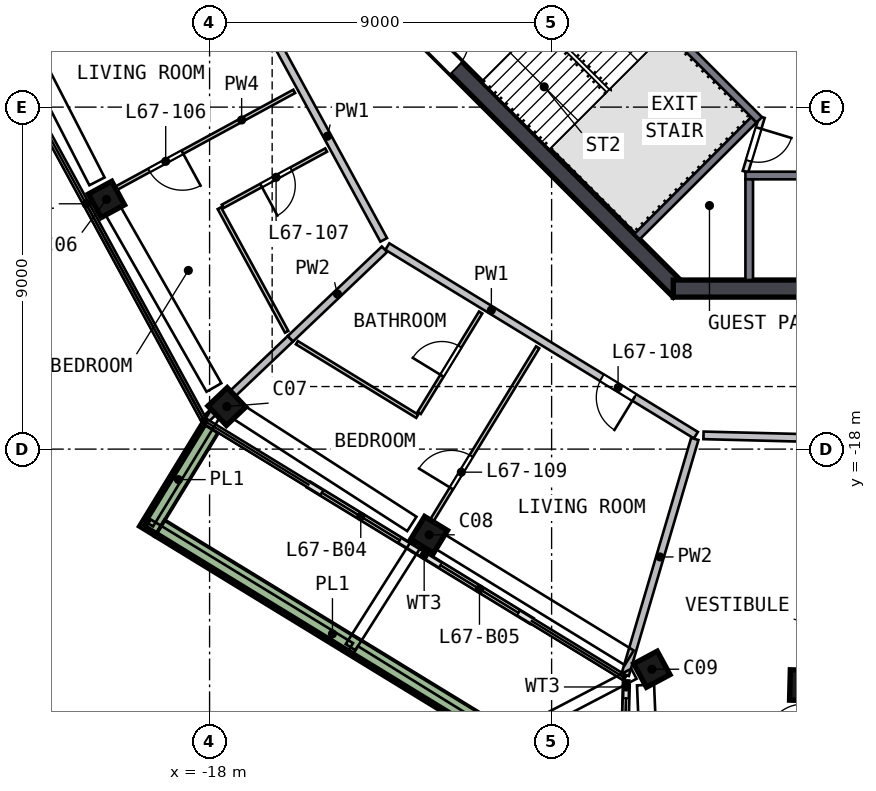
"""IFC4 building model, lengths in metres.
Left out: names, types, materials, properties, quantities, classifications, styles, units other than length and angle.
Written with IfcOpenShell. Run it as: python <this file> out.ifc"""

import sys

from ifc_helpers import new_model, si_unit, direction, frame, frame_2d, origin, origin_2d, place, context, subcontext, project, spatial, rectangle, extrude, element, fill, save


model = new_model("IFC4")
c1 = context("Model", 3, precision=1e-05, world=origin(), true_north=direction((0.0, 1.0)))
c2 = subcontext(c1, "Body", "Model", "MODEL_VIEW")
j1 = project(units=[si_unit("LENGTHUNIT", "METRE"), si_unit("PLANEANGLEUNIT", "RADIAN")], contexts=[c1])
p1 = place(None, origin())
s1 = spatial("IfcSite", under=j1, at=p1, CompositionType="ELEMENT")
p2 = place(p1, origin())
s2 = spatial("IfcBuilding", under=s1, at=p2, CompositionType="ELEMENT")
p3 = place(p2, frame((0.0, 0.0, 274.0)))
s3 = spatial("IfcBuildingStorey", under=s2, at=p3, CompositionType="ELEMENT", Elevation=274.0)
p4 = place(p3, frame((-20.78, -11.311, 0.0), z_axis=(0.054678505, -0.0984061, 0.993643045), x_axis=(0.475225292, -0.872632983, -0.112572636)))
e1 = element("IfcColumn", 1, at=p4, inside=s3, PredefinedType="COLUMN", context=c2, shape_type="SweptSolid", body=[
    extrude(rectangle(XDim=0.7, YDim=0.7, at=origin_2d()), origin(), (0.0, 0.0, 1.0), 3.21),
])
p5 = place(p3, frame((-17.644, -16.779, 0.0), z_axis=(0.080429245, -0.083241987, 0.993278364), x_axis=(-0.684092384, 0.720153088, 0.115746011)))
e2 = element("IfcColumn", 2, at=p5, inside=s3, PredefinedType="COLUMN", context=c2, shape_type="SweptSolid", body=[
    extrude(rectangle(XDim=0.7, YDim=0.7, at=origin_2d()), origin(), (0.0, 0.0, 1.0), 3.211),
])
p6 = place(p3, frame((-12.34, -20.185, 0.0), z_axis=(0.096505434, -0.057872841, 0.993648547), x_axis=(0.847798451, -0.518243304, -0.112524062)))
e3 = element("IfcColumn", 3, at=p6, inside=s3, PredefinedType="COLUMN", context=c2, shape_type="SweptSolid", body=[
    extrude(rectangle(XDim=0.7, YDim=0.7, at=origin_2d()), origin(), (0.0, 0.0, 1.0), 3.21),
])
p7 = place(p3, frame((-6.499, -23.756, 0.0), z_axis=(0.113176251, -0.029947242, 0.993123506), x_axis=(-0.470487, 0.878762487, 0.080115381)))
e4 = element("IfcColumn", 4, at=p7, inside=s3, PredefinedType="COLUMN", context=c2, shape_type="SweptSolid", body=[
    extrude(rectangle(XDim=0.7, YDim=0.7, at=origin_2d()), origin(), (0.0, 0.0, 1.0), 3.212),
])
p8 = place(p3, frame((-2.466, -24.204, 0.0), z_axis=(0.115246525, -0.010718839, 0.993279087), x_axis=(-0.025644135, -0.99964061, -0.007812094)))
e5 = element("IfcColumn", 5, at=p8, inside=s3, PredefinedType="COLUMN", context=c2, shape_type="SweptSolid", body=[
    extrude(rectangle(XDim=0.8, YDim=0.8, at=origin_2d()), origin(), (0.0, 0.0, 1.0), 3.211),
])
p9 = place(p3, frame((-13.841, -5.64, 0.0), z_axis=(0.0, 0.0, 1.0), x_axis=(0.707106781, -0.707106781, 0.0)))
e6 = element("IfcWall", 6, at=p9, inside=s3, PredefinedType="SHEAR", context=c2, shape_type="SweptSolid", body=[
    extrude(rectangle(XDim=11.598, YDim=0.45, at=frame_2d((5.799, 0.0))), origin(), (0.0, 0.0, 1.0), 3.5),
])
p10 = place(p9, frame((2.099, 0.0, 0.0)))
e7 = element("IfcOpeningElement", 7, at=p10, cuts=e6, PredefinedType="OPENING", context=c2, shape_type="SweptSolid", body=[
    extrude(rectangle(XDim=1.2, YDim=2.1, at=frame_2d((0.6, 1.05))), frame((0.0, 0.235, 0.0), z_axis=(0.0, -1.0, 0.0), x_axis=(1.0, 0.0, 0.0)), (0.0, 0.0, 1.0), 0.47),
])
p11 = place(p3, frame((-5.799, -13.775, 0.0), z_axis=(0.0, 0.0, 1.0), x_axis=(1.0, 0.0, 0.0)))
e8 = element("IfcWall", 8, at=p11, inside=s3, PredefinedType="SHEAR", context=c2, shape_type="SweptSolid", body=[
    extrude(rectangle(XDim=11.598, YDim=0.45, at=frame_2d((5.799, 0.0))), origin(), (0.0, 0.0, 1.0), 3.5),
])
p12 = place(p3, frame((-15.387, -18.938, 0.0), z_axis=(0.0, 0.0, 1.0), x_axis=(0.853194542, -0.521592824, 0.0)))
e9 = element("IfcWall", 9, at=p12, inside=s3, PredefinedType="SOLIDWALL", context=c2, shape_type="SweptSolid", body=[
    extrude(rectangle(XDim=3.25, YDim=0.15, at=frame_2d((1.625, 0.0))), origin(), (0.0, 0.0, 1.0), 2.525),
])
p13 = place(p12, frame((0.4, 0.0, 0.0)))
e10 = element("IfcOpeningElement", 10, at=p13, cuts=e9, PredefinedType="OPENING", context=c2, shape_type="SweptSolid", body=[
    extrude(rectangle(XDim=2.4, YDim=2.4, at=frame_2d((1.2, 1.2))), frame((0.0, 0.085, 0.0), z_axis=(0.0, -1.0, 0.0), x_axis=(1.0, 0.0, 0.0)), (0.0, 0.0, 1.0), 0.17),
])
p14 = place(p3, frame((-12.614, -20.633, 0.0), z_axis=(0.0, 0.0, 1.0), x_axis=(0.853186571, -0.521605862, 0.0)))
e11 = element("IfcWall", 11, at=p14, inside=s3, PredefinedType="SOLIDWALL", context=c2, shape_type="SweptSolid", body=[
    extrude(rectangle(XDim=3.612, YDim=0.15, at=frame_2d((1.806, 0.0))), origin(), (0.0, 0.0, 1.0), 2.525),
])
p15 = place(p14, frame((0.811, 0.0, 0.0)))
e12 = element("IfcOpeningElement", 12, at=p15, cuts=e11, PredefinedType="OPENING", context=c2, shape_type="SweptSolid", body=[
    extrude(rectangle(XDim=2.4, YDim=2.4, at=frame_2d((1.2, 1.2))), frame((0.0, 0.085, 0.0), z_axis=(0.0, -1.0, 0.0), x_axis=(1.0, 0.0, 0.0)), (0.0, 0.0, 1.0), 0.17),
])
p16 = place(p3, frame((-7.034, -24.159, 0.0), z_axis=(0.0, 0.0, 1.0), x_axis=(-0.025100843, -0.999684924, 0.0)))
e13 = element("IfcWall", 13, at=p16, inside=s3, PredefinedType="SOLIDWALL", context=c2, shape_type="SweptSolid", body=[
    extrude(rectangle(XDim=3.2, YDim=0.15, at=frame_2d((1.6, 0.0))), origin(), (0.0, 0.0, 1.0), 2.525),
])
p17 = place(p16, frame((0.4, 0.0, 0.0)))
e14 = element("IfcOpeningElement", 14, at=p17, cuts=e13, PredefinedType="OPENING", context=c2, shape_type="SweptSolid", body=[
    extrude(rectangle(XDim=2.4, YDim=2.4, at=frame_2d((1.2, 1.2))), frame((0.0, 0.085, 0.0), z_axis=(0.0, -1.0, 0.0), x_axis=(1.0, 0.0, 0.0)), (0.0, 0.0, 1.0), 0.17),
])
p18 = place(p3, frame((-17.986, -17.438, 0.0), z_axis=(0.0, 0.0, 1.0), x_axis=(-0.521582752, -0.853200699, 0.0)))
e15 = element("IfcWall", 15, at=p18, inside=s3, PredefinedType="SOLIDWALL", context=c2, shape_type="SweptSolid", body=[
    extrude(rectangle(XDim=3.199, YDim=0.5, at=frame_2d((1.599, 0.0))), origin(), (0.0, 0.0, 1.0), 0.7),
])
p19 = place(p3, frame((-19.311, -20.084, 0.0), z_axis=(0.0, 0.0, 1.0), x_axis=(0.853182108, -0.521613162, 0.0)))
e16 = element("IfcWall", 16, at=p19, inside=s3, PredefinedType="SOLIDWALL", context=c2, shape_type="SweptSolid", body=[
    extrude(rectangle(XDim=10.652, YDim=0.5, at=frame_2d((5.326, 0.0))), origin(), (0.0, 0.0, 1.0), 0.7),
])
p20 = place(p3, frame((-3.9, -10.8, 0.0), z_axis=(0.0, 0.0, 1.0), x_axis=(1.0, 0.0, 0.0)))
e17 = element("IfcWall", 17, at=p20, inside=s3, PredefinedType="SOLIDWALL", context=c2, shape_type="SweptSolid", body=[
    extrude(rectangle(XDim=7.8, YDim=0.2, at=frame_2d((3.9, 0.0))), origin(), (0.0, 0.0, 1.0), 3.19),
])
p21 = place(p20, frame((3.45, 0.0, 0.0)))
e18 = element("IfcOpeningElement", 18, at=p21, cuts=e17, PredefinedType="OPENING", context=c2, shape_type="SweptSolid", body=[
    extrude(rectangle(XDim=0.9, YDim=2.1, at=frame_2d((0.45, 1.05))), frame((0.0, 0.11, 0.0), z_axis=(0.0, -1.0, 0.0), x_axis=(1.0, 0.0, 0.0)), (0.0, 0.0, 1.0), 0.22),
])
p22 = place(p3, frame((-3.8, -10.9, 0.0), z_axis=(0.0, 0.0, 1.0), x_axis=(0.0, -1.0, 0.0)))
e19 = element("IfcWall", 19, at=p22, inside=s3, PredefinedType="SOLIDWALL", context=c2, shape_type="SweptSolid", body=[
    extrude(rectangle(XDim=2.65, YDim=0.2, at=frame_2d((1.325, 0.0))), origin(), (0.0, 0.0, 1.0), 3.19),
])
p23 = place(p3, frame((-3.535, -9.334, 0.0), z_axis=(0.0, 0.0, 1.0), x_axis=(-0.707120946, 0.707092617, 0.0)))
e20 = element("IfcWall", 20, at=p23, inside=s3, PredefinedType="SOLIDWALL", context=c2, shape_type="SweptSolid", body=[
    extrude(rectangle(XDim=8.618, YDim=0.2, at=frame_2d((4.309, 0.0))), origin(), (0.0, 0.0, 1.0), 3.19),
])
p24 = place(p23, frame((6.6, 0.0, 0.0)))
e21 = element("IfcOpeningElement", 21, at=p24, cuts=e20, PredefinedType="OPENING", context=c2, shape_type="SweptSolid", body=[
    extrude(rectangle(XDim=1.2, YDim=2.1, at=frame_2d((0.6, 1.05))), frame((0.0, 0.11, 0.0), z_axis=(0.0, -1.0, 0.0), x_axis=(1.0, 0.0, 0.0)), (0.0, 0.0, 1.0), 0.22),
])
p25 = place(p3, frame((-3.677, -9.334, 0.0), z_axis=(0.0, 0.0, 1.0), x_axis=(-0.707106781, -0.707106781, 0.0)))
e22 = element("IfcWall", 22, at=p25, inside=s3, PredefinedType="SOLIDWALL", context=c2, shape_type="SweptSolid", body=[
    extrude(rectangle(XDim=4.35, YDim=0.2, at=frame_2d((2.175, 0.0))), origin(), (0.0, 0.0, 1.0), 3.19),
])
p26 = place(p3, frame((-3.465, -9.263, 0.0), z_axis=(0.0, 0.0, 1.0), x_axis=(-0.289808785, -0.957084567, 0.0)))
e23 = element("IfcWall", 23, at=p26, inside=s3, PredefinedType="PARTITIONING", context=c2, shape_type="SweptSolid", body=[
    extrude(rectangle(XDim=1.501, YDim=0.15, at=frame_2d((0.75, 0.0))), origin(), (0.0, 0.0, 1.0), 3.19),
])
p27 = place(p26, frame((0.301, 0.0, 0.0)))
e24 = element("IfcOpeningElement", 24, at=p27, cuts=e23, PredefinedType="OPENING", context=c2, shape_type="SweptSolid", body=[
    extrude(rectangle(XDim=0.9, YDim=2.1, at=frame_2d((0.45, 1.05))), frame((0.0, 0.085, 0.0), z_axis=(0.0, -1.0, 0.0), x_axis=(1.0, 0.0, 0.0)), (0.0, 0.0, 1.0), 0.17),
])
p28 = place(p3, frame((-13.418, -12.493, 0.0), z_axis=(0.0, 0.0, 1.0), x_axis=(-0.478080636, 0.878315948, 0.0)))
e25 = element("IfcWall", 25, at=p28, inside=s3, PredefinedType="SOLIDWALL", context=c2, shape_type="SweptSolid", body=[
    extrude(rectangle(XDim=9.337, YDim=0.2, at=frame_2d((4.668, 0.0))), origin(), (0.0, 0.0, 1.0), 3.19),
])
p29 = place(p28, frame((6.408, 0.0, 0.0)))
e26 = element("IfcOpeningElement", 26, at=p29, cuts=e25, PredefinedType="OPENING", context=c2, shape_type="SweptSolid", body=[
    extrude(rectangle(XDim=1.0, YDim=2.1, at=frame_2d((0.5, 1.05))), frame((0.0, 0.11, 0.0), z_axis=(0.0, -1.0, 0.0), x_axis=(1.0, 0.0, 0.0)), (0.0, 0.0, 1.0), 0.22),
])
p30 = place(p3, frame((-5.203, -17.633, 0.0), z_axis=(0.0, 0.0, 1.0), x_axis=(-0.853187331, 0.521604619, 0.0)))
e27 = element("IfcWall", 27, at=p30, inside=s3, PredefinedType="SOLIDWALL", context=c2, shape_type="SweptSolid", body=[
    extrude(rectangle(XDim=9.517, YDim=0.2, at=frame_2d((4.758, 0.0))), origin(), (0.0, 0.0, 1.0), 3.19),
])
p31 = place(p30, frame((1.9, 0.0, 0.0)))
e28 = element("IfcOpeningElement", 28, at=p31, cuts=e27, PredefinedType="OPENING", context=c2, shape_type="SweptSolid", body=[
    extrude(rectangle(XDim=1.0, YDim=2.1, at=frame_2d((0.5, 1.05))), frame((0.0, 0.11, 0.0), z_axis=(0.0, -1.0, 0.0), x_axis=(1.0, 0.0, 0.0)), (0.0, 0.0, 1.0), 0.22),
])
p32 = place(p3, frame((4.311, -17.872, 0.0), z_axis=(0.0, 0.0, 1.0), x_axis=(-0.999684183, 0.025130335, 0.0)))
e29 = element("IfcWall", 29, at=p32, inside=s3, PredefinedType="SOLIDWALL", context=c2, shape_type="SweptSolid", body=[
    extrude(rectangle(XDim=9.317, YDim=0.2, at=frame_2d((4.658, 0.0))), origin(), (0.0, 0.0, 1.0), 3.19),
])
p33 = place(p32, frame((3.842, 0.0, 0.0)))
e30 = element("IfcOpeningElement", 30, at=p33, cuts=e29, PredefinedType="OPENING", context=c2, shape_type="SweptSolid", body=[
    extrude(rectangle(XDim=1.8, YDim=2.1, at=frame_2d((0.9, 1.05))), frame((0.0, 0.11, 0.0), z_axis=(0.0, -1.0, 0.0), x_axis=(1.0, 0.0, 0.0)), (0.0, 0.0, 1.0), 0.22),
])
p34 = place(p3, frame((-15.873, -15.095, 0.0), z_axis=(0.0, 0.0, 1.0), x_axis=(-0.724638726, -0.689128955, 0.0)))
e31 = element("IfcWall", 31, at=p34, inside=s3, PredefinedType="SOLIDWALL", context=c2, shape_type="SweptSolid", body=[
    extrude(rectangle(XDim=3.06, YDim=0.2, at=frame_2d((1.53, 0.0))), origin(), (0.0, 0.0, 1.0), 3.19),
])
p35 = place(p3, frame((-13.398, -12.74, 0.0), z_axis=(0.0, 0.0, 1.0), x_axis=(-0.724642487, -0.689125, 0.0)))
e32 = element("IfcWall", 32, at=p35, inside=s3, PredefinedType="SOLIDWALL", context=c2, shape_type="SweptSolid", body=[
    extrude(rectangle(XDim=3.416, YDim=0.2, at=frame_2d((1.708, 0.0))), origin(), (0.0, 0.0, 1.0), 3.19),
])
p36 = place(p3, frame((-7.065, -23.944, 0.0), z_axis=(0.0, 0.0, 1.0), x_axis=(0.283011215, 0.9591166, 0.0)))
e33 = element("IfcWall", 33, at=p36, inside=s3, PredefinedType="SOLIDWALL", context=c2, shape_type="SweptSolid", body=[
    extrude(rectangle(XDim=6.476, YDim=0.2, at=frame_2d((3.238, 0.0))), origin(), (0.0, 0.0, 1.0), 3.19),
])
p37 = place(p3, frame((-15.773, -8.585, 0.0), z_axis=(0.0, 0.0, 1.0), x_axis=(-0.878315476, -0.478081504, 0.0)))
e34 = element("IfcWall", 34, at=p37, inside=s3, PredefinedType="PARTITIONING", context=c2, shape_type="SweptSolid", body=[
    extrude(rectangle(XDim=6.15, YDim=0.1, at=frame_2d((3.075, 0.0))), origin(), (0.0, 0.0, 1.0), 3.19),
])
p38 = place(p37, frame((3.35, 0.0, 0.0)))
e35 = element("IfcOpeningElement", 35, at=p38, cuts=e34, PredefinedType="OPENING", context=c2, shape_type="SweptSolid", body=[
    extrude(rectangle(XDim=1.0, YDim=2.1, at=frame_2d((0.5, 1.05))), frame((0.0, 0.06, 0.0), z_axis=(0.0, -1.0, 0.0), x_axis=(1.0, 0.0, 0.0)), (0.0, 0.0, 1.0), 0.12),
])
p39 = place(p3, frame((-17.743, -11.66, 0.0), z_axis=(0.0, 0.0, 1.0), x_axis=(0.478053023, -0.878330978, 0.0)))
e36 = element("IfcWall", 36, at=p39, inside=s3, PredefinedType="PARTITIONING", context=c2, shape_type="SweptSolid", body=[
    extrude(rectangle(XDim=3.704, YDim=0.1, at=frame_2d((1.852, 0.0))), origin(), (0.0, 0.0, 1.0), 3.19),
])
p40 = place(p3, frame((-14.933, -10.13, 0.0), z_axis=(0.0, 0.0, 1.0), x_axis=(-0.87832263, -0.478068361, 0.0)))
e37 = element("IfcWall", 37, at=p40, inside=s3, PredefinedType="PARTITIONING", context=c2, shape_type="SweptSolid", body=[
    extrude(rectangle(XDim=3.1, YDim=0.1, at=frame_2d((1.55, 0.0))), origin(), (0.0, 0.0, 1.0), 3.19),
])
p41 = place(p40, frame((1.05, 0.0, 0.0)))
e38 = element("IfcOpeningElement", 38, at=p41, cuts=e37, PredefinedType="OPENING", context=c2, shape_type="SweptSolid", body=[
    extrude(rectangle(XDim=0.9, YDim=2.1, at=frame_2d((0.45, 1.05))), frame((0.0, 0.06, 0.0), z_axis=(0.0, -1.0, 0.0), x_axis=(1.0, 0.0, 0.0)), (0.0, 0.0, 1.0), 0.12),
])
p42 = place(p3, frame((-15.703, -15.199, 0.0), z_axis=(0.0, 0.0, 1.0), x_axis=(0.853161467, -0.521646921, 0.0)))
e39 = element("IfcWall", 39, at=p42, inside=s3, PredefinedType="PARTITIONING", context=c2, shape_type="SweptSolid", body=[
    extrude(rectangle(XDim=3.711, YDim=0.1, at=frame_2d((1.855, 0.0))), origin(), (0.0, 0.0, 1.0), 3.19),
])
p43 = place(p3, frame((-12.484, -17.05, 0.0), z_axis=(0.0, 0.0, 1.0), x_axis=(0.521669797, 0.85314748, 0.0)))
e40 = element("IfcWall", 40, at=p43, inside=s3, PredefinedType="PARTITIONING", context=c2, shape_type="SweptSolid", body=[
    extrude(rectangle(XDim=3.1, YDim=0.1, at=frame_2d((1.55, 0.0))), origin(), (0.0, 0.0, 1.0), 3.19),
])
p44 = place(p43, frame((1.15, 0.0, 0.0)))
e41 = element("IfcOpeningElement", 41, at=p44, cuts=e40, PredefinedType="OPENING", context=c2, shape_type="SweptSolid", body=[
    extrude(rectangle(XDim=0.9, YDim=2.1, at=frame_2d((0.45, 1.05))), frame((0.0, 0.06, 0.0), z_axis=(0.0, -1.0, 0.0), x_axis=(1.0, 0.0, 0.0)), (0.0, 0.0, 1.0), 0.12),
])
p45 = place(p3, frame((-12.575, -20.569, 0.0), z_axis=(0.0, 0.0, 1.0), x_axis=(0.521594521, 0.853193504, 0.0)))
e42 = element("IfcWall", 42, at=p45, inside=s3, PredefinedType="PARTITIONING", context=c2, shape_type="SweptSolid", body=[
    extrude(rectangle(XDim=6.15, YDim=0.1, at=frame_2d((3.075, 0.0))), origin(), (0.0, 0.0, 1.0), 3.19),
])
p46 = place(p45, frame((1.8, 0.0, 0.0)))
e43 = element("IfcOpeningElement", 43, at=p46, cuts=e42, PredefinedType="OPENING", context=c2, shape_type="SweptSolid", body=[
    extrude(rectangle(XDim=1.0, YDim=2.1, at=frame_2d((0.5, 1.05))), frame((0.0, 0.06, 0.0), z_axis=(0.0, -1.0, 0.0), x_axis=(1.0, 0.0, 0.0)), (0.0, 0.0, 1.0), 0.12),
])
p47 = place(p13, origin())
e44 = element("IfcDoor", 44, at=p47, inside=s3, OperationType="SLIDING_TO_RIGHT", PredefinedType="DOOR", context=c2, shape_type="SweptSolid", body=[
    extrude(rectangle(XDim=2.4, YDim=2.4, at=frame_2d((1.2, 1.2))), frame((0.0, 0.025, 0.0), z_axis=(0.0, -1.0, 0.0), x_axis=(1.0, 0.0, 0.0)), (0.0, 0.0, 1.0), 0.05),
])
fill(e10, e44)
p48 = place(p15, origin())
e45 = element("IfcDoor", 45, at=p48, inside=s3, OperationType="SLIDING_TO_LEFT", PredefinedType="DOOR", context=c2, shape_type="SweptSolid", body=[
    extrude(rectangle(XDim=2.4, YDim=2.4, at=frame_2d((1.2, 1.2))), frame((0.0, 0.025, 0.0), z_axis=(0.0, -1.0, 0.0), x_axis=(1.0, 0.0, 0.0)), (0.0, 0.0, 1.0), 0.05),
])
fill(e12, e45)
p49 = place(p17, origin())
e46 = element("IfcDoor", 46, at=p49, inside=s3, OperationType="SLIDING_TO_LEFT", PredefinedType="DOOR", context=c2, shape_type="SweptSolid", body=[
    extrude(rectangle(XDim=2.4, YDim=2.4, at=frame_2d((1.2, 1.2))), frame((0.0, 0.025, 0.0), z_axis=(0.0, -1.0, 0.0), x_axis=(1.0, 0.0, 0.0)), (0.0, 0.0, 1.0), 0.05),
])
fill(e14, e46)
p50 = place(p10, origin())
e47 = element("IfcDoor", 47, at=p50, inside=s3, OperationType="SINGLE_SWING_LEFT", PredefinedType="DOOR", context=c2, shape_type="SweptSolid", body=[
    extrude(rectangle(XDim=1.2, YDim=2.1, at=frame_2d((0.6, 1.05))), frame((0.0, 0.025, 0.0), z_axis=(0.0, -1.0, 0.0), x_axis=(1.0, 0.0, 0.0)), (0.0, 0.0, 1.0), 0.05),
])
fill(e7, e47)
p51 = place(p27, origin())
e48 = element("IfcDoor", 48, at=p51, inside=s3, OperationType="SINGLE_SWING_LEFT", PredefinedType="DOOR", context=c2, shape_type="SweptSolid", body=[
    extrude(rectangle(XDim=0.9, YDim=2.1, at=frame_2d((0.45, 1.05))), frame((0.0, 0.025, 0.0), z_axis=(0.0, -1.0, 0.0), x_axis=(1.0, 0.0, 0.0)), (0.0, 0.0, 1.0), 0.05),
])
fill(e24, e48)
p52 = place(p38, origin())
e49 = element("IfcDoor", 49, at=p52, inside=s3, OperationType="SINGLE_SWING_LEFT", PredefinedType="DOOR", context=c2, shape_type="SweptSolid", body=[
    extrude(rectangle(XDim=1.0, YDim=2.1, at=frame_2d((0.5, 1.05))), frame((0.0, 0.025, 0.0), z_axis=(0.0, -1.0, 0.0), x_axis=(1.0, 0.0, 0.0)), (0.0, 0.0, 1.0), 0.05),
])
fill(e35, e49)
p53 = place(p41, origin())
e50 = element("IfcDoor", 50, at=p53, inside=s3, OperationType="SINGLE_SWING_RIGHT", PredefinedType="DOOR", context=c2, shape_type="SweptSolid", body=[
    extrude(rectangle(XDim=0.9, YDim=2.1, at=frame_2d((0.45, 1.05))), frame((0.0, 0.025, 0.0), z_axis=(0.0, -1.0, 0.0), x_axis=(1.0, 0.0, 0.0)), (0.0, 0.0, 1.0), 0.05),
])
fill(e38, e50)
p54 = place(p31, origin())
e51 = element("IfcDoor", 51, at=p54, inside=s3, OperationType="SINGLE_SWING_LEFT", PredefinedType="DOOR", context=c2, shape_type="SweptSolid", body=[
    extrude(rectangle(XDim=1.0, YDim=2.1, at=frame_2d((0.5, 1.05))), frame((0.0, 0.025, 0.0), z_axis=(0.0, -1.0, 0.0), x_axis=(1.0, 0.0, 0.0)), (0.0, 0.0, 1.0), 0.05),
])
fill(e28, e51)
p55 = place(p46, origin())
e52 = element("IfcDoor", 52, at=p55, inside=s3, OperationType="SINGLE_SWING_LEFT", PredefinedType="DOOR", context=c2, shape_type="SweptSolid", body=[
    extrude(rectangle(XDim=1.0, YDim=2.1, at=frame_2d((0.5, 1.05))), frame((0.0, 0.025, 0.0), z_axis=(0.0, -1.0, 0.0), x_axis=(1.0, 0.0, 0.0)), (0.0, 0.0, 1.0), 0.05),
])
fill(e43, e52)
p56 = place(p44, origin())
e53 = element("IfcDoor", 53, at=p56, inside=s3, OperationType="SINGLE_SWING_LEFT", PredefinedType="DOOR", context=c2, shape_type="SweptSolid", body=[
    extrude(rectangle(XDim=0.9, YDim=2.1, at=frame_2d((0.45, 1.05))), frame((0.0, 0.025, 0.0), z_axis=(0.0, -1.0, 0.0), x_axis=(1.0, 0.0, 0.0)), (0.0, 0.0, 1.0), 0.05),
])
fill(e41, e53)
save(model, sys.argv[1])
